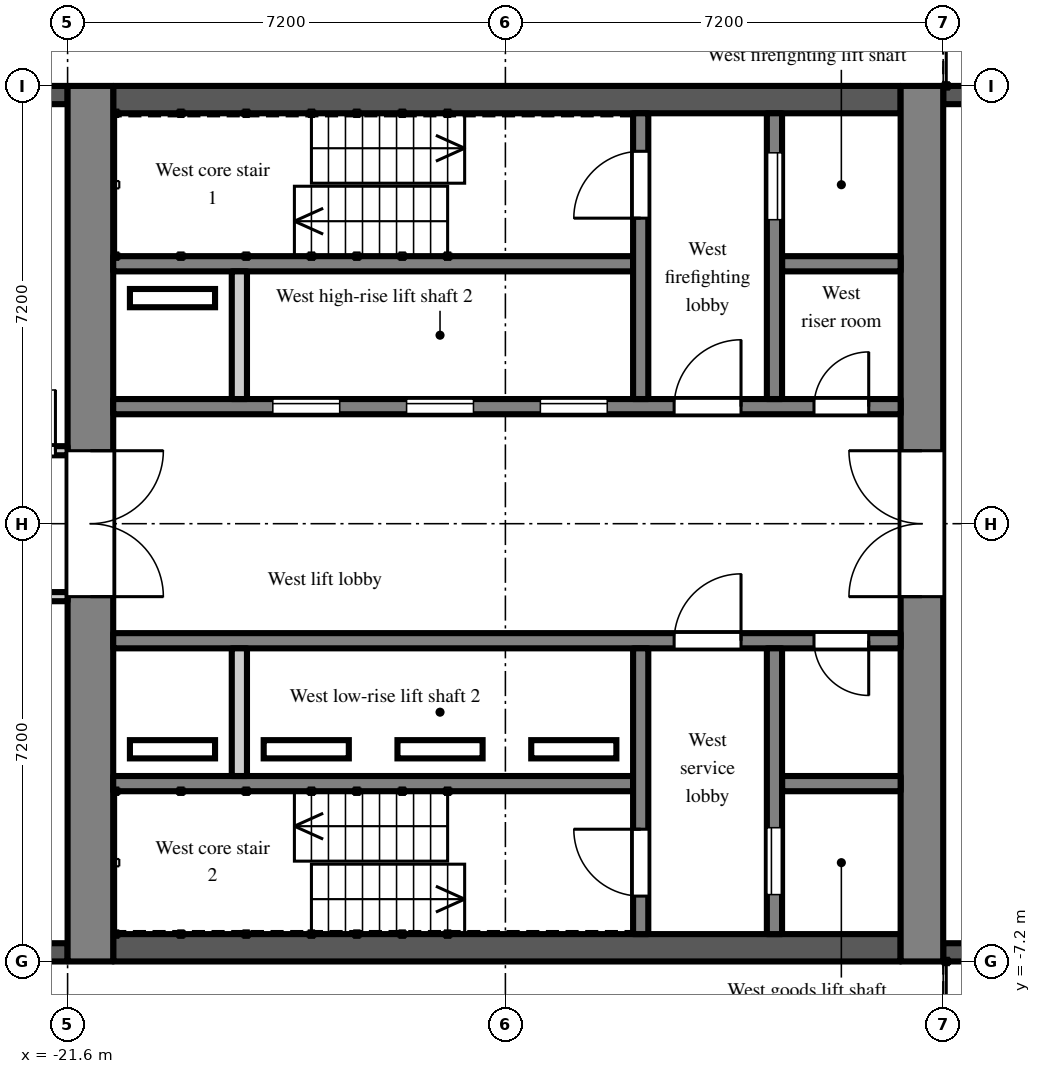
"""IFC4 building model, lengths in metres.
Left out: names, types, materials, properties, quantities, classifications, styles, units other than length and angle.
Written with IfcOpenShell. Run it as: python <this file> out.ifc"""

import sys

from ifc_helpers import new_model, si_unit, direction, frame, frame_2d, origin, place, context, subcontext, project, spatial, rectangle, extrude, element, fill, save


model = new_model("IFC4")
c1 = context("Model", 3, precision=1e-05, world=origin(), true_north=direction((0.0, 1.0)))
c2 = subcontext(c1, "Body", "Model", "MODEL_VIEW")
j1 = project(units=[si_unit("LENGTHUNIT", "METRE"), si_unit("PLANEANGLEUNIT", "RADIAN")], contexts=[c1])
p1 = place(None, origin())
s1 = spatial("IfcSite", under=j1, at=p1, CompositionType="ELEMENT")
p2 = place(p1, origin())
s2 = spatial("IfcBuilding", under=s1, at=p2, CompositionType="ELEMENT")
p3 = place(p2, frame((0.0, 0.0, 120.3)))
s3 = spatial("IfcBuildingStorey", under=s2, at=p3, CompositionType="ELEMENT", Elevation=120.3)
p4 = place(p3, frame((-4.2, 7.05, 0.0), z_axis=(0.0, 0.0, 1.0), x_axis=(-1.0, 0.0, 0.0)))
e1 = element("IfcWall", 1, at=p4, inside=s3, PredefinedType="SOLIDWALL", context=c2, shape_type="SweptSolid", body=[
    extrude(rectangle(XDim=3.0, YDim=0.3, at=frame_2d((1.5, 0.0))), origin(), (0.0, 0.0, 1.0), 2.2),
])
p5 = place(p3, frame((-21.6, 7.05, 0.0), z_axis=(0.0, 0.0, 1.0), x_axis=(-1.0, 0.0, 0.0)))
e2 = element("IfcWall", 2, at=p5, inside=s3, PredefinedType="SOLIDWALL", context=c2, shape_type="SweptSolid", body=[
    extrude(rectangle(XDim=2.7, YDim=0.3, at=frame_2d((1.35, 0.0))), origin(), (0.0, 0.0, 1.0), 2.2),
])
p6 = place(p5, frame((0.75, 0.0, 0.2)))
e3 = element("IfcOpeningElement", 3, at=p6, cuts=e2, PredefinedType="OPENING", context=c2, shape_type="SweptSolid", body=[
    extrude(rectangle(XDim=1.2, YDim=1.85, at=frame_2d((0.6, 0.925))), frame((0.0, 0.16, 0.0), z_axis=(0.0, -1.0, 0.0), x_axis=(1.0, 0.0, 0.0)), (0.0, 0.0, 1.0), 0.32),
])
p7 = place(p3, frame((-24.3, -7.05, 0.0), z_axis=(0.0, 0.0, 1.0), x_axis=(1.0, 0.0, 0.0)))
e4 = element("IfcWall", 4, at=p7, inside=s3, PredefinedType="SOLIDWALL", context=c2, shape_type="SweptSolid", body=[
    extrude(rectangle(XDim=2.7, YDim=0.3, at=frame_2d((1.35, 0.0))), origin(), (0.0, 0.0, 1.0), 2.2),
])
p8 = place(p7, frame((0.75, 0.0, 0.2)))
e5 = element("IfcOpeningElement", 5, at=p8, cuts=e4, PredefinedType="OPENING", context=c2, shape_type="SweptSolid", body=[
    extrude(rectangle(XDim=1.2, YDim=1.85, at=frame_2d((0.6, 0.925))), frame((0.0, 0.16, 0.0), z_axis=(0.0, -1.0, 0.0), x_axis=(1.0, 0.0, 0.0)), (0.0, 0.0, 1.0), 0.32),
])
p9 = place(p3, frame((-7.2, -7.05, 0.0), z_axis=(0.0, 0.0, 1.0), x_axis=(1.0, 0.0, 0.0)))
e6 = element("IfcWall", 6, at=p9, inside=s3, PredefinedType="SOLIDWALL", context=c2, shape_type="SweptSolid", body=[
    extrude(rectangle(XDim=3.0, YDim=0.3, at=frame_2d((1.5, 0.0))), origin(), (0.0, 0.0, 1.0), 2.2),
])
p10 = place(p3, frame((-7.55, -7.2, 0.0), z_axis=(0.0, 0.0, 1.0), x_axis=(0.0, 1.0, 0.0)))
e7 = element("IfcWall", 7, at=p10, inside=s3, PredefinedType="SHEAR", context=c2, shape_type="SweptSolid", body=[
    extrude(rectangle(XDim=14.4, YDim=0.7, at=frame_2d((7.2, 0.0))), origin(), (0.0, 0.0, 1.0), 2.6),
])
p11 = place(p10, frame((6.0, 0.0, 0.0)))
e8 = element("IfcOpeningElement", 8, at=p11, cuts=e7, PredefinedType="OPENING", context=c2, shape_type="SweptSolid", body=[
    extrude(rectangle(XDim=2.4, YDim=2.2, at=frame_2d((1.2, 1.1))), frame((0.0, 0.36, 0.0), z_axis=(0.0, -1.0, 0.0), x_axis=(1.0, 0.0, 0.0)), (0.0, 0.0, 1.0), 0.72),
])
p12 = place(p3, frame((-21.225, -7.2, 0.0), z_axis=(0.0, 0.0, 1.0), x_axis=(0.0, 1.0, 0.0)))
e9 = element("IfcWall", 9, at=p12, inside=s3, PredefinedType="SHEAR", context=c2, shape_type="SweptSolid", body=[
    extrude(rectangle(XDim=14.4, YDim=0.75, at=frame_2d((7.2, 0.0))), origin(), (0.0, 0.0, 1.0), 2.6),
])
p13 = place(p12, frame((6.0, 0.0, 0.0)))
e10 = element("IfcOpeningElement", 10, at=p13, cuts=e9, PredefinedType="OPENING", context=c2, shape_type="SweptSolid", body=[
    extrude(rectangle(XDim=2.4, YDim=2.2, at=frame_2d((1.2, 1.1))), frame((0.0, 0.385, 0.0), z_axis=(0.0, -1.0, 0.0), x_axis=(1.0, 0.0, 0.0)), (0.0, 0.0, 1.0), 0.77),
])
p14 = place(p3, frame((-7.9, 6.975, 0.0), z_axis=(0.0, 0.0, 1.0), x_axis=(-1.0, 0.0, 0.0)))
e11 = element("IfcWall", 11, at=p14, inside=s3, PredefinedType="SHEAR", context=c2, shape_type="SweptSolid", body=[
    extrude(rectangle(XDim=12.95, YDim=0.45, at=frame_2d((6.475, 0.0))), origin(), (0.0, 0.0, 1.0), 2.6),
])
p15 = place(p3, frame((-7.9, 1.925, 0.0), z_axis=(0.0, 0.0, 1.0), x_axis=(-1.0, 0.0, 0.0)))
e12 = element("IfcWall", 12, at=p15, inside=s3, PredefinedType="SHEAR", context=c2, shape_type="SweptSolid", body=[
    extrude(rectangle(XDim=12.95, YDim=0.25, at=frame_2d((6.475, 0.0))), origin(), (0.0, 0.0, 1.0), 2.6),
])
p16 = place(p15, frame((4.825, 0.0, 0.0)))
e13 = element("IfcOpeningElement", 13, at=p16, cuts=e12, PredefinedType="OPENING", context=c2, shape_type="SweptSolid", body=[
    extrude(rectangle(XDim=1.1, YDim=2.1, at=frame_2d((0.55, 1.05))), frame((0.0, 0.135, 0.0), z_axis=(0.0, -1.0, 0.0), x_axis=(1.0, 0.0, 0.0)), (0.0, 0.0, 1.0), 0.27),
])
p17 = place(p15, frame((7.025, 0.0, 0.0)))
e14 = element("IfcOpeningElement", 14, at=p17, cuts=e12, PredefinedType="OPENING", context=c2, shape_type="SweptSolid", body=[
    extrude(rectangle(XDim=1.1, YDim=2.1, at=frame_2d((0.55, 1.05))), frame((0.0, 0.135, 0.0), z_axis=(0.0, -1.0, 0.0), x_axis=(1.0, 0.0, 0.0)), (0.0, 0.0, 1.0), 0.27),
])
p18 = place(p15, frame((9.225, 0.0, 0.0)))
e15 = element("IfcOpeningElement", 15, at=p18, cuts=e12, PredefinedType="OPENING", context=c2, shape_type="SweptSolid", body=[
    extrude(rectangle(XDim=1.1, YDim=2.1, at=frame_2d((0.55, 1.05))), frame((0.0, 0.135, 0.0), z_axis=(0.0, -1.0, 0.0), x_axis=(1.0, 0.0, 0.0)), (0.0, 0.0, 1.0), 0.27),
])
p19 = place(p15, frame((0.525, 0.0, 0.0)))
e16 = element("IfcOpeningElement", 16, at=p19, cuts=e12, PredefinedType="OPENING", context=c2, shape_type="SweptSolid", body=[
    extrude(rectangle(XDim=0.9, YDim=2.1, at=frame_2d((0.45, 1.05))), frame((0.0, 0.135, 0.0), z_axis=(0.0, -1.0, 0.0), x_axis=(1.0, 0.0, 0.0)), (0.0, 0.0, 1.0), 0.27),
])
p20 = place(p15, frame((2.625, 0.0, 0.0)))
e17 = element("IfcOpeningElement", 17, at=p20, cuts=e12, PredefinedType="OPENING", context=c2, shape_type="SweptSolid", body=[
    extrude(rectangle(XDim=1.1, YDim=2.1, at=frame_2d((0.55, 1.05))), frame((0.0, 0.135, 0.0), z_axis=(0.0, -1.0, 0.0), x_axis=(1.0, 0.0, 0.0)), (0.0, 0.0, 1.0), 0.27),
])
p21 = place(p3, frame((-7.9, 4.275, 0.0), z_axis=(0.0, 0.0, 1.0), x_axis=(-1.0, 0.0, 0.0)))
e18 = element("IfcWall", 18, at=p21, inside=s3, PredefinedType="SHEAR", context=c2, shape_type="SweptSolid", body=[
    extrude(rectangle(XDim=1.95, YDim=0.25, at=frame_2d((0.975, 0.0))), origin(), (0.0, 0.0, 1.0), 2.6),
])
p22 = place(p3, frame((-12.3, 4.275, 0.0), z_axis=(0.0, 0.0, 1.0), x_axis=(-1.0, 0.0, 0.0)))
e19 = element("IfcWall", 19, at=p22, inside=s3, PredefinedType="SHEAR", context=c2, shape_type="SweptSolid", body=[
    extrude(rectangle(XDim=8.55, YDim=0.25, at=frame_2d((4.275, 0.0))), origin(), (0.0, 0.0, 1.0), 2.6),
])
p23 = place(p3, frame((-9.975, 2.05, 0.0), z_axis=(0.0, 0.0, 1.0), x_axis=(0.0, 1.0, 0.0)))
e20 = element("IfcWall", 20, at=p23, inside=s3, PredefinedType="SHEAR", context=c2, shape_type="SweptSolid", body=[
    extrude(rectangle(XDim=4.7, YDim=0.25, at=frame_2d((2.35, 0.0))), origin(), (0.0, 0.0, 1.0), 2.6),
])
p24 = place(p23, frame((2.95, 0.0, 0.0)))
e21 = element("IfcOpeningElement", 21, at=p24, cuts=e20, PredefinedType="OPENING", context=c2, shape_type="SweptSolid", body=[
    extrude(rectangle(XDim=1.1, YDim=2.1, at=frame_2d((0.55, 1.05))), frame((0.0, 0.135, 0.0), z_axis=(0.0, -1.0, 0.0), x_axis=(1.0, 0.0, 0.0)), (0.0, 0.0, 1.0), 0.27),
])
p25 = place(p3, frame((-12.175, 2.05, 0.0), z_axis=(0.0, 0.0, 1.0), x_axis=(0.0, 1.0, 0.0)))
e22 = element("IfcWall", 22, at=p25, inside=s3, PredefinedType="SHEAR", context=c2, shape_type="SweptSolid", body=[
    extrude(rectangle(XDim=4.7, YDim=0.25, at=frame_2d((2.35, 0.0))), origin(), (0.0, 0.0, 1.0), 2.6),
])
p26 = place(p25, frame((2.975, 0.0, 0.0)))
e23 = element("IfcOpeningElement", 23, at=p26, cuts=e22, PredefinedType="OPENING", context=c2, shape_type="SweptSolid", body=[
    extrude(rectangle(XDim=1.1, YDim=2.1, at=frame_2d((0.55, 1.05))), frame((0.0, 0.135, 0.0), z_axis=(0.0, -1.0, 0.0), x_axis=(1.0, 0.0, 0.0)), (0.0, 0.0, 1.0), 0.27),
])
p27 = place(p3, frame((-18.775, 2.05, 0.0), z_axis=(0.0, 0.0, 1.0), x_axis=(0.0, 1.0, 0.0)))
e24 = element("IfcWall", 24, at=p27, inside=s3, PredefinedType="PARTITIONING", context=c2, shape_type="SweptSolid", body=[
    extrude(rectangle(XDim=2.1, YDim=0.25, at=frame_2d((1.05, 0.0))), origin(), (0.0, 0.0, 1.0), 2.6),
])
p28 = place(p3, frame((-7.9, -6.975, 0.0), z_axis=(0.0, 0.0, 1.0), x_axis=(-1.0, 0.0, 0.0)))
e25 = element("IfcWall", 25, at=p28, inside=s3, PredefinedType="SHEAR", context=c2, shape_type="SweptSolid", body=[
    extrude(rectangle(XDim=12.95, YDim=0.45, at=frame_2d((6.475, 0.0))), origin(), (0.0, 0.0, 1.0), 2.6),
])
p29 = place(p3, frame((-7.9, -1.925, 0.0), z_axis=(0.0, 0.0, 1.0), x_axis=(-1.0, 0.0, 0.0)))
e26 = element("IfcWall", 26, at=p29, inside=s3, PredefinedType="SHEAR", context=c2, shape_type="SweptSolid", body=[
    extrude(rectangle(XDim=12.95, YDim=0.25, at=frame_2d((6.475, 0.0))), origin(), (0.0, 0.0, 1.0), 2.6),
])
p30 = place(p29, frame((0.525, 0.0, 0.0)))
e27 = element("IfcOpeningElement", 27, at=p30, cuts=e26, PredefinedType="OPENING", context=c2, shape_type="SweptSolid", body=[
    extrude(rectangle(XDim=0.9, YDim=2.1, at=frame_2d((0.45, 1.05))), frame((0.0, 0.135, 0.0), z_axis=(0.0, -1.0, 0.0), x_axis=(1.0, 0.0, 0.0)), (0.0, 0.0, 1.0), 0.27),
])
p31 = place(p29, frame((2.625, 0.0, 0.0)))
e28 = element("IfcOpeningElement", 28, at=p31, cuts=e26, PredefinedType="OPENING", context=c2, shape_type="SweptSolid", body=[
    extrude(rectangle(XDim=1.1, YDim=2.1, at=frame_2d((0.55, 1.05))), frame((0.0, 0.135, 0.0), z_axis=(0.0, -1.0, 0.0), x_axis=(1.0, 0.0, 0.0)), (0.0, 0.0, 1.0), 0.27),
])
p32 = place(p3, frame((-7.9, -4.275, 0.0), z_axis=(0.0, 0.0, 1.0), x_axis=(-1.0, 0.0, 0.0)))
e29 = element("IfcWall", 29, at=p32, inside=s3, PredefinedType="SHEAR", context=c2, shape_type="SweptSolid", body=[
    extrude(rectangle(XDim=1.95, YDim=0.25, at=frame_2d((0.975, 0.0))), origin(), (0.0, 0.0, 1.0), 2.6),
])
p33 = place(p3, frame((-12.3, -4.275, 0.0), z_axis=(0.0, 0.0, 1.0), x_axis=(-1.0, 0.0, 0.0)))
e30 = element("IfcWall", 30, at=p33, inside=s3, PredefinedType="SHEAR", context=c2, shape_type="SweptSolid", body=[
    extrude(rectangle(XDim=8.55, YDim=0.25, at=frame_2d((4.275, 0.0))), origin(), (0.0, 0.0, 1.0), 2.6),
])
p34 = place(p3, frame((-9.975, -2.05, 0.0), z_axis=(0.0, 0.0, 1.0), x_axis=(0.0, -1.0, 0.0)))
e31 = element("IfcWall", 31, at=p34, inside=s3, PredefinedType="SHEAR", context=c2, shape_type="SweptSolid", body=[
    extrude(rectangle(XDim=4.7, YDim=0.25, at=frame_2d((2.35, 0.0))), origin(), (0.0, 0.0, 1.0), 2.6),
])
p35 = place(p34, frame((2.95, 0.0, 0.0)))
e32 = element("IfcOpeningElement", 32, at=p35, cuts=e31, PredefinedType="OPENING", context=c2, shape_type="SweptSolid", body=[
    extrude(rectangle(XDim=1.1, YDim=2.1, at=frame_2d((0.55, 1.05))), frame((0.0, 0.135, 0.0), z_axis=(0.0, -1.0, 0.0), x_axis=(1.0, 0.0, 0.0)), (0.0, 0.0, 1.0), 0.27),
])
p36 = place(p3, frame((-12.175, -2.05, 0.0), z_axis=(0.0, 0.0, 1.0), x_axis=(0.0, -1.0, 0.0)))
e33 = element("IfcWall", 33, at=p36, inside=s3, PredefinedType="SHEAR", context=c2, shape_type="SweptSolid", body=[
    extrude(rectangle(XDim=4.7, YDim=0.25, at=frame_2d((2.35, 0.0))), origin(), (0.0, 0.0, 1.0), 2.6),
])
p37 = place(p36, frame((2.975, 0.0, 0.0)))
e34 = element("IfcOpeningElement", 34, at=p37, cuts=e33, PredefinedType="OPENING", context=c2, shape_type="SweptSolid", body=[
    extrude(rectangle(XDim=1.1, YDim=2.1, at=frame_2d((0.55, 1.05))), frame((0.0, 0.135, 0.0), z_axis=(0.0, -1.0, 0.0), x_axis=(1.0, 0.0, 0.0)), (0.0, 0.0, 1.0), 0.27),
])
p38 = place(p3, frame((-18.775, -2.05, 0.0), z_axis=(0.0, 0.0, 1.0), x_axis=(0.0, -1.0, 0.0)))
e35 = element("IfcWall", 35, at=p38, inside=s3, PredefinedType="PARTITIONING", context=c2, shape_type="SweptSolid", body=[
    extrude(rectangle(XDim=2.1, YDim=0.25, at=frame_2d((1.05, 0.0))), origin(), (0.0, 0.0, 1.0), 2.6),
])
p39 = place(p3, frame((-36.5, -1.2, 0.0), z_axis=(0.0, 0.0, 1.0), x_axis=(1.0, 0.0, 0.0)))
e36 = element("IfcWall", 36, at=p39, inside=s3, PredefinedType="PARTITIONING", context=c2, shape_type="SweptSolid", body=[
    extrude(rectangle(XDim=14.9, YDim=0.15, at=frame_2d((7.45, 0.0))), origin(), (0.0, 0.0, 1.0), 2.6),
])
p40 = place(p39, frame((13.3, 0.0, 0.0)))
e37 = element("IfcOpeningElement", 37, at=p40, cuts=e36, PredefinedType="OPENING", context=c2, shape_type="SweptSolid", body=[
    extrude(rectangle(XDim=1.0, YDim=2.1, at=frame_2d((0.5, 1.05))), frame((0.0, 0.085, 0.0), z_axis=(0.0, -1.0, 0.0), x_axis=(1.0, 0.0, 0.0)), (0.0, 0.0, 1.0), 0.17),
])
p41 = place(p39, frame((4.41, 0.0, 0.0)))
e38 = element("IfcOpeningElement", 38, at=p41, cuts=e36, PredefinedType="OPENING", context=c2, shape_type="SweptSolid", body=[
    extrude(rectangle(XDim=1.0, YDim=2.1, at=frame_2d((0.5, 1.05))), frame((0.0, 0.085, 0.0), z_axis=(0.0, -1.0, 0.0), x_axis=(1.0, 0.0, 0.0)), (0.0, 0.0, 1.0), 0.17),
])
p42 = place(p39, frame((1.15, 0.0, 0.0)))
e39 = element("IfcOpeningElement", 39, at=p42, cuts=e36, PredefinedType="OPENING", context=c2, shape_type="SweptSolid", body=[
    extrude(rectangle(XDim=1.8, YDim=2.1, at=frame_2d((0.9, 1.05))), frame((0.0, 0.085, 0.0), z_axis=(0.0, -1.0, 0.0), x_axis=(1.0, 0.0, 0.0)), (0.0, 0.0, 1.0), 0.17),
])
p43 = place(p3, frame((-36.5, 1.2, 0.0), z_axis=(0.0, 0.0, 1.0), x_axis=(1.0, 0.0, 0.0)))
e40 = element("IfcWall", 40, at=p43, inside=s3, PredefinedType="PARTITIONING", context=c2, shape_type="SweptSolid", body=[
    extrude(rectangle(XDim=14.9, YDim=0.15, at=frame_2d((7.45, 0.0))), origin(), (0.0, 0.0, 1.0), 2.6),
])
p44 = place(p43, frame((13.7, 0.0, 0.0)))
e41 = element("IfcOpeningElement", 41, at=p44, cuts=e40, PredefinedType="OPENING", context=c2, shape_type="SweptSolid", body=[
    extrude(rectangle(XDim=1.0, YDim=2.1, at=frame_2d((0.5, 1.05))), frame((0.0, 0.085, 0.0), z_axis=(0.0, -1.0, 0.0), x_axis=(1.0, 0.0, 0.0)), (0.0, 0.0, 1.0), 0.17),
])
p45 = place(p43, frame((8.19, 0.0, 0.0)))
e42 = element("IfcOpeningElement", 42, at=p45, cuts=e40, PredefinedType="OPENING", context=c2, shape_type="SweptSolid", body=[
    extrude(rectangle(XDim=1.0, YDim=2.1, at=frame_2d((0.5, 1.05))), frame((0.0, 0.085, 0.0), z_axis=(0.0, -1.0, 0.0), x_axis=(1.0, 0.0, 0.0)), (0.0, 0.0, 1.0), 0.17),
])
p46 = place(p43, frame((1.15, 0.0, 0.0)))
e43 = element("IfcOpeningElement", 43, at=p46, cuts=e40, PredefinedType="OPENING", context=c2, shape_type="SweptSolid", body=[
    extrude(rectangle(XDim=1.8, YDim=2.1, at=frame_2d((0.9, 1.05))), frame((0.0, 0.085, 0.0), z_axis=(0.0, -1.0, 0.0), x_axis=(1.0, 0.0, 0.0)), (0.0, 0.0, 1.0), 0.17),
])
p47 = place(p16, origin())
e44 = element("IfcDoor", 44, at=p47, inside=s3, OperationType="SLIDING_TO_LEFT", PredefinedType="DOOR", context=c2, shape_type="SweptSolid", body=[
    extrude(rectangle(XDim=1.1, YDim=2.1, at=frame_2d((0.55, 1.05))), frame((0.0, 0.025, 0.0), z_axis=(0.0, -1.0, 0.0), x_axis=(1.0, 0.0, 0.0)), (0.0, 0.0, 1.0), 0.05),
])
fill(e13, e44)
p48 = place(p17, origin())
e45 = element("IfcDoor", 45, at=p48, inside=s3, OperationType="SLIDING_TO_LEFT", PredefinedType="DOOR", context=c2, shape_type="SweptSolid", body=[
    extrude(rectangle(XDim=1.1, YDim=2.1, at=frame_2d((0.55, 1.05))), frame((0.0, 0.025, 0.0), z_axis=(0.0, -1.0, 0.0), x_axis=(1.0, 0.0, 0.0)), (0.0, 0.0, 1.0), 0.05),
])
fill(e14, e45)
p49 = place(p18, origin())
e46 = element("IfcDoor", 46, at=p49, inside=s3, OperationType="SLIDING_TO_LEFT", PredefinedType="DOOR", context=c2, shape_type="SweptSolid", body=[
    extrude(rectangle(XDim=1.1, YDim=2.1, at=frame_2d((0.55, 1.05))), frame((0.0, 0.025, 0.0), z_axis=(0.0, -1.0, 0.0), x_axis=(1.0, 0.0, 0.0)), (0.0, 0.0, 1.0), 0.05),
])
fill(e15, e46)
p50 = place(p24, origin())
e47 = element("IfcDoor", 47, at=p50, inside=s3, OperationType="SLIDING_TO_LEFT", PredefinedType="DOOR", context=c2, shape_type="SweptSolid", body=[
    extrude(rectangle(XDim=1.1, YDim=2.1, at=frame_2d((0.55, 1.05))), frame((0.0, 0.025, 0.0), z_axis=(0.0, -1.0, 0.0), x_axis=(1.0, 0.0, 0.0)), (0.0, 0.0, 1.0), 0.05),
])
fill(e21, e47)
p51 = place(p35, origin())
e48 = element("IfcDoor", 48, at=p51, inside=s3, OperationType="SLIDING_TO_LEFT", PredefinedType="DOOR", context=c2, shape_type="SweptSolid", body=[
    extrude(rectangle(XDim=1.1, YDim=2.1, at=frame_2d((0.55, 1.05))), frame((0.0, 0.025, 0.0), z_axis=(0.0, -1.0, 0.0), x_axis=(1.0, 0.0, 0.0)), (0.0, 0.0, 1.0), 0.05),
])
fill(e32, e48)
p52 = place(p26, origin())
e49 = element("IfcDoor", 49, at=p52, inside=s3, OperationType="SINGLE_SWING_LEFT", PredefinedType="DOOR", context=c2, shape_type="SweptSolid", body=[
    extrude(rectangle(XDim=1.1, YDim=2.1, at=frame_2d((0.55, 1.05))), frame((0.0, 0.025, 0.0), z_axis=(0.0, -1.0, 0.0), x_axis=(1.0, 0.0, 0.0)), (0.0, 0.0, 1.0), 0.05),
])
fill(e23, e49)
p53 = place(p37, frame((1.1, 0.0, 0.0), z_axis=(0.0, 0.0, 1.0), x_axis=(-1.0, 0.0, 0.0)))
e50 = element("IfcDoor", 50, at=p53, inside=s3, OperationType="SINGLE_SWING_RIGHT", PredefinedType="DOOR", context=c2, shape_type="SweptSolid", body=[
    extrude(rectangle(XDim=1.1, YDim=2.1, at=frame_2d((0.55, 1.05))), frame((0.0, 0.025, 0.0), z_axis=(0.0, -1.0, 0.0), x_axis=(1.0, 0.0, 0.0)), (0.0, 0.0, 1.0), 0.05),
])
fill(e34, e50)
p54 = place(p19, frame((0.9, 0.0, 0.0), z_axis=(0.0, 0.0, 1.0), x_axis=(-1.0, 0.0, 0.0)))
e51 = element("IfcDoor", 51, at=p54, inside=s3, OperationType="SINGLE_SWING_RIGHT", PredefinedType="DOOR", context=c2, shape_type="SweptSolid", body=[
    extrude(rectangle(XDim=0.9, YDim=2.1, at=frame_2d((0.45, 1.05))), frame((0.0, 0.025, 0.0), z_axis=(0.0, -1.0, 0.0), x_axis=(1.0, 0.0, 0.0)), (0.0, 0.0, 1.0), 0.05),
])
fill(e16, e51)
p55 = place(p30, origin())
e52 = element("IfcDoor", 52, at=p55, inside=s3, OperationType="SINGLE_SWING_LEFT", PredefinedType="DOOR", context=c2, shape_type="SweptSolid", body=[
    extrude(rectangle(XDim=0.9, YDim=2.1, at=frame_2d((0.45, 1.05))), frame((0.0, 0.025, 0.0), z_axis=(0.0, -1.0, 0.0), x_axis=(1.0, 0.0, 0.0)), (0.0, 0.0, 1.0), 0.05),
])
fill(e27, e52)
p56 = place(p20, frame((1.1, 0.0, 0.0), z_axis=(0.0, 0.0, 1.0), x_axis=(-1.0, 0.0, 0.0)))
e53 = element("IfcDoor", 53, at=p56, inside=s3, OperationType="SINGLE_SWING_RIGHT", PredefinedType="DOOR", context=c2, shape_type="SweptSolid", body=[
    extrude(rectangle(XDim=1.1, YDim=2.1, at=frame_2d((0.55, 1.05))), frame((0.0, 0.025, 0.0), z_axis=(0.0, -1.0, 0.0), x_axis=(1.0, 0.0, 0.0)), (0.0, 0.0, 1.0), 0.05),
])
fill(e17, e53)
p57 = place(p31, frame((1.1, 0.0, 0.0), z_axis=(0.0, 0.0, 1.0), x_axis=(-1.0, 0.0, 0.0)))
e54 = element("IfcDoor", 54, at=p57, inside=s3, OperationType="SINGLE_SWING_RIGHT", PredefinedType="DOOR", context=c2, shape_type="SweptSolid", body=[
    extrude(rectangle(XDim=1.1, YDim=2.1, at=frame_2d((0.55, 1.05))), frame((0.0, 0.025, 0.0), z_axis=(0.0, -1.0, 0.0), x_axis=(1.0, 0.0, 0.0)), (0.0, 0.0, 1.0), 0.05),
])
fill(e28, e54)
p58 = place(p11, origin())
e55 = element("IfcDoor", 55, at=p58, inside=s3, OperationType="DOUBLE_DOOR_DOUBLE_SWING", PredefinedType="DOOR", context=c2, shape_type="SweptSolid", body=[
    extrude(rectangle(XDim=2.4, YDim=2.2, at=frame_2d((1.2, 1.1))), frame((0.0, 0.025, 0.0), z_axis=(0.0, -1.0, 0.0), x_axis=(1.0, 0.0, 0.0)), (0.0, 0.0, 1.0), 0.05),
])
fill(e8, e55)
p59 = place(p13, frame((2.4, 0.0, 0.0), z_axis=(0.0, 0.0, 1.0), x_axis=(-1.0, 0.0, 0.0)))
e56 = element("IfcDoor", 56, at=p59, inside=s3, OperationType="DOUBLE_DOOR_DOUBLE_SWING", PredefinedType="DOOR", context=c2, shape_type="SweptSolid", body=[
    extrude(rectangle(XDim=2.4, YDim=2.2, at=frame_2d((1.2, 1.1))), frame((0.0, 0.025, 0.0), z_axis=(0.0, -1.0, 0.0), x_axis=(1.0, 0.0, 0.0)), (0.0, 0.0, 1.0), 0.05),
])
fill(e10, e56)
p60 = place(p44, origin())
e57 = element("IfcDoor", 57, at=p60, inside=s3, OperationType="SINGLE_SWING_RIGHT", PredefinedType="DOOR", context=c2, shape_type="SweptSolid", body=[
    extrude(rectangle(XDim=1.0, YDim=2.1, at=frame_2d((0.5, 1.05))), frame((0.0, 0.025, 0.0), z_axis=(0.0, -1.0, 0.0), x_axis=(1.0, 0.0, 0.0)), (0.0, 0.0, 1.0), 0.05),
])
fill(e41, e57)
save(model, sys.argv[1])
